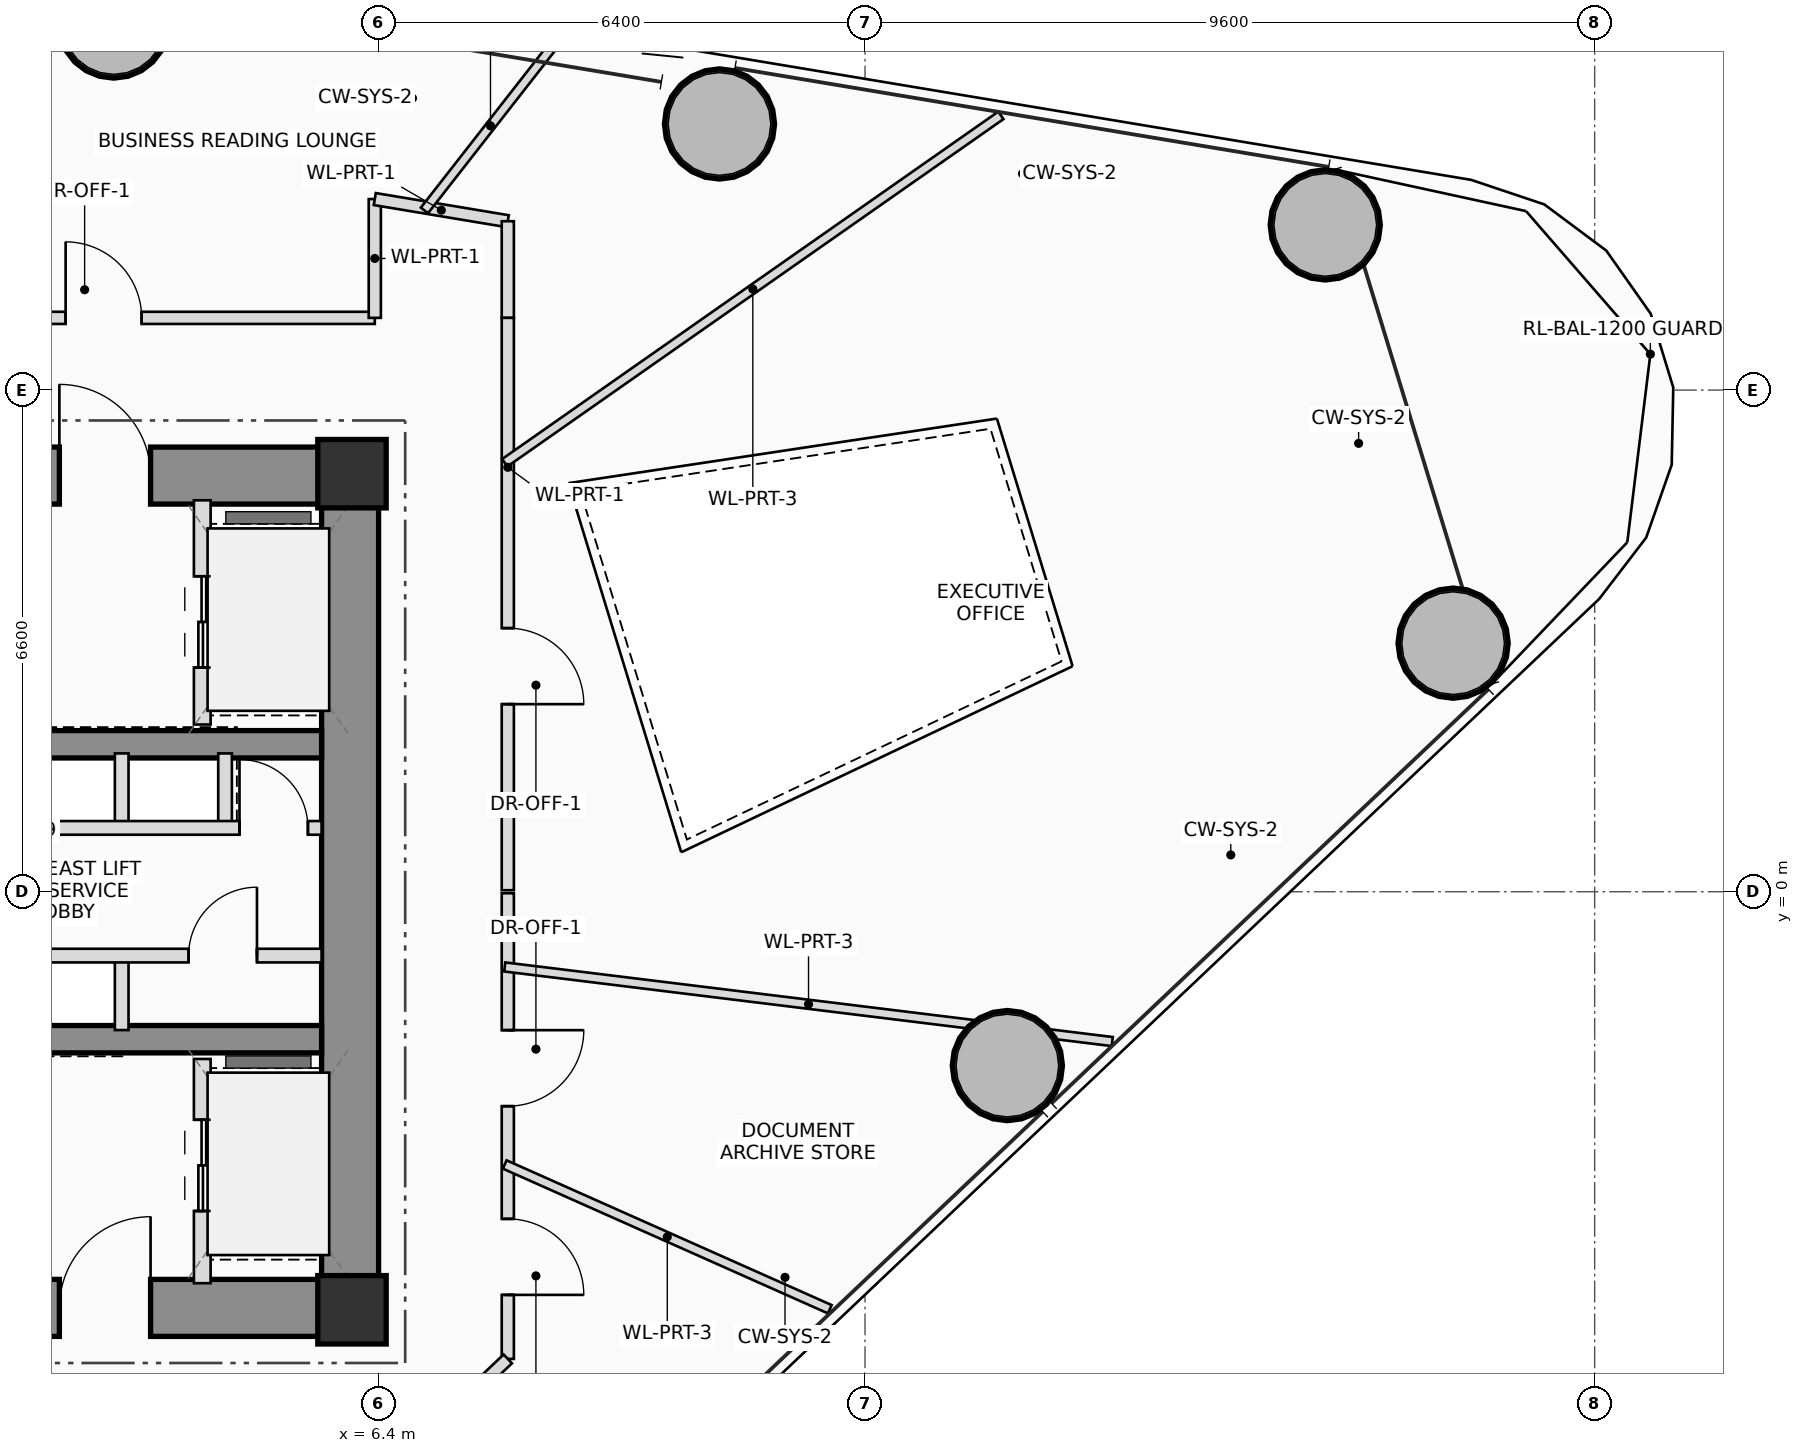
"""IFC4 building model, lengths in metres.
Left out: names, types, materials, properties, quantities, classifications, styles, units other than length and angle.
Written with IfcOpenShell. Run it as: python <this file> out.ifc"""

import sys

from ifc_helpers import new_model, si_unit, direction, frame, frame_2d, origin, origin_2d, place, context, subcontext, project, spatial, rectangle, hollow_circle, extrude, source, transform, mapped, element, fill, save


model = new_model("IFC4")
c1 = context("Model", 3, precision=1e-05, world=origin(), true_north=direction((0.0, 1.0)))
c2 = subcontext(c1, "Body", "Model", "MODEL_VIEW")
j1 = project(units=[si_unit("LENGTHUNIT", "METRE"), si_unit("PLANEANGLEUNIT", "RADIAN")], contexts=[c1])
p1 = place(None, origin())
s1 = spatial("IfcSite", under=j1, at=p1, CompositionType="ELEMENT")
p2 = place(p1, origin())
s2 = spatial("IfcBuilding", under=s1, at=p2, CompositionType="ELEMENT")
p3 = place(p2, frame((0.0, 0.0, 104.9)))
s3 = spatial("IfcBuildingStorey", under=s2, at=p3, CompositionType="ELEMENT", Elevation=104.9)
m1 = source(origin(), c2, "Body", "SweptSolid", [
    extrude(rectangle(XDim=0.9, YDim=0.9, at=origin_2d()), origin(), (0.0, 0.0, 1.0), 3.75),
])
for number, where, z_axis, x_axis in (
    (1, (6.05, -5.5, 0.0), (0.0, 0.0, 1.0), (1.0, 0.0, 0.0)),
    (2, (6.05, 5.5, 0.0), (0.0, 0.0, 1.0), (1.0, 0.0, 0.0)),
):
    element("IfcColumn", number, at=place(p3, frame(where, z_axis=z_axis, x_axis=x_axis)), inside=s3, PredefinedType="COLUMN", context=c2, shape_type="MappedRepresentation", body=[
        mapped(m1, transform((0.0, 0.0, 0.0), scale=1.0)),
    ])
p4 = place(p3, frame((-6.4, 5.475, 0.0), z_axis=(0.0, 0.0, 1.0), x_axis=(1.0, 0.0, 0.0)))
e3 = element("IfcWall", 3, at=p4, inside=s3, PredefinedType="SHEAR", context=c2, shape_type="SweptSolid", body=[
    extrude(rectangle(XDim=12.8, YDim=0.75, at=frame_2d((6.4, 0.0))), origin(), (0.0, 0.0, 1.0), 3.75),
])
p5 = place(p4, frame((8.6, 0.0, 0.0)))
e4 = element("IfcOpeningElement", 4, at=p5, cuts=e3, PredefinedType="OPENING", context=c2, shape_type="SweptSolid", body=[
    extrude(rectangle(XDim=1.2, YDim=2.2, at=frame_2d((0.6, 1.1))), frame((0.0, 0.385, 0.0), z_axis=(0.0, -1.0, 0.0), x_axis=(1.0, 0.0, 0.0)), (0.0, 0.0, 1.0), 0.77),
])
p6 = place(p3, frame((-6.4, -5.475, 0.0), z_axis=(0.0, 0.0, 1.0), x_axis=(1.0, 0.0, 0.0)))
e5 = element("IfcWall", 5, at=p6, inside=s3, PredefinedType="SHEAR", context=c2, shape_type="SweptSolid", body=[
    extrude(rectangle(XDim=12.8, YDim=0.75, at=frame_2d((6.4, 0.0))), origin(), (0.0, 0.0, 1.0), 3.75),
])
p7 = place(p6, frame((8.6, 0.0, 0.0)))
e6 = element("IfcOpeningElement", 6, at=p7, cuts=e5, PredefinedType="OPENING", context=c2, shape_type="SweptSolid", body=[
    extrude(rectangle(XDim=1.2, YDim=2.2, at=frame_2d((0.6, 1.1))), frame((0.0, 0.385, 0.0), z_axis=(0.0, -1.0, 0.0), x_axis=(1.0, 0.0, 0.0)), (0.0, 0.0, 1.0), 0.77),
])
p8 = place(p3, frame((6.025, -5.1, 0.0), z_axis=(0.0, 0.0, 1.0), x_axis=(0.0, 1.0, 0.0)))
e7 = element("IfcWall", 7, at=p8, inside=s3, PredefinedType="SHEAR", context=c2, shape_type="SweptSolid", body=[
    extrude(rectangle(XDim=10.2, YDim=0.75, at=frame_2d((5.1, 0.0))), origin(), (0.0, 0.0, 1.0), 3.75),
])
for number, where, z_axis, x_axis in (
    (8, (-5.65, 1.94, 0.0), (0.0, 0.0, 1.0), (1.0, 0.0, 0.0)),
    (9, (-5.65, -1.94, 0.0), (0.0, 0.0, 1.0), (1.0, 0.0, 0.0)),
):
    element("IfcWall", number, at=place(p3, frame(where, z_axis=z_axis, x_axis=x_axis)), inside=s3, PredefinedType="SHEAR", context=c2, shape_type="SweptSolid", body=[
        extrude(rectangle(XDim=11.3, YDim=0.36, at=frame_2d((5.65, 0.0))), origin(), (0.0, 0.0, 1.0), 3.75),
    ])
m2 = source(origin(), c2, "Body", "SweptSolid", [
    extrude(hollow_circle(Radius=0.725, WallThickness=0.05, at=origin_2d()), origin(), (0.0, 0.0, 1.0), 3.75),
])
for number, where, z_axis, x_axis in (
    (10, (14.673, -2.287, 0.0), (0.0, 0.0, 1.0), (1.0, 0.0, 0.0)),
    (11, (20.538, 3.271, 0.0), (0.0, 0.0, 1.0), (1.0, 0.0, 0.0)),
    (12, (18.855, 8.773, 0.0), (0.0, 0.0, 1.0), (1.0, 0.0, 0.0)),
    (13, (10.885, 10.101, 0.0), (0.0, 0.0, 1.0), (1.0, 0.0, 0.0)),
    (14, (2.915, 11.429, 0.0), (0.0, 0.0, 1.0), (1.0, 0.0, 0.0)),
):
    element("IfcColumn", number, at=place(p3, frame(where, z_axis=z_axis, x_axis=x_axis)), inside=s3, PredefinedType="COLUMN", context=c2, shape_type="MappedRepresentation", body=[
        mapped(m2, transform((0.0, 0.0, 0.0), scale=1.0)),
    ])
p9 = place(p3, frame((4.08, 2.2, 0.0), z_axis=(0.0, 0.0, 1.0), x_axis=(0.0, 1.0, 0.0)))
e15 = element("IfcWall", 15, at=p9, inside=s3, PredefinedType="PLUMBINGWALL", context=c2, shape_type="SweptSolid", body=[
    extrude(rectangle(XDim=2.95, YDim=0.22, at=frame_2d((1.475, 0.0))), origin(), (0.0, 0.0, 1.0), 3.545),
])
p10 = place(p9, frame((0.75, 0.0, 0.0)))
e16 = element("IfcOpeningElement", 16, at=p10, cuts=e15, PredefinedType="OPENING", context=c2, shape_type="SweptSolid", body=[
    extrude(rectangle(XDim=1.2, YDim=2.25, at=frame_2d((0.6, 1.125))), frame((0.0, 0.12, 0.0), z_axis=(0.0, -1.0, 0.0), x_axis=(1.0, 0.0, 0.0)), (0.0, 0.0, 1.0), 0.24),
])
p11 = place(p3, frame((4.08, -5.15, 0.0), z_axis=(0.0, 0.0, 1.0), x_axis=(0.0, 1.0, 0.0)))
e17 = element("IfcWall", 17, at=p11, inside=s3, PredefinedType="PLUMBINGWALL", context=c2, shape_type="SweptSolid", body=[
    extrude(rectangle(XDim=2.95, YDim=0.22, at=frame_2d((1.475, 0.0))), origin(), (0.0, 0.0, 1.0), 3.545),
])
p12 = place(p11, frame((0.95, 0.0, 0.0)))
e18 = element("IfcOpeningElement", 18, at=p12, cuts=e17, PredefinedType="OPENING", context=c2, shape_type="SweptSolid", body=[
    extrude(rectangle(XDim=1.2, YDim=2.25, at=frame_2d((0.6, 1.125))), frame((0.0, 0.12, 0.0), z_axis=(0.0, -1.0, 0.0), x_axis=(1.0, 0.0, 0.0)), (0.0, 0.0, 1.0), 0.24),
])
for number, where, z_axis, x_axis in (
    (19, (3.02, 0.84, 0.0), (0.0, 0.0, 1.0), (0.0, 1.0, 0.0)),
    (20, (4.38, 0.84, 0.0), (0.0, 0.0, 1.0), (0.0, 1.0, 0.0)),
    (21, (3.02, -1.82, 0.0), (0.0, 0.0, 1.0), (0.0, 1.0, 0.0)),
):
    element("IfcWall", number, at=place(p3, frame(where, z_axis=z_axis, x_axis=x_axis)), inside=s3, PredefinedType="PLUMBINGWALL", context=c2, shape_type="SweptSolid", body=[
        extrude(rectangle(XDim=0.98, YDim=0.18, at=frame_2d((0.49, 0.0))), origin(), (0.0, 0.0, 1.0), 3.545),
    ])
p13 = place(p3, frame((-5.68, 0.84, 0.0), z_axis=(0.0, 0.0, 1.0), x_axis=(1.0, 0.0, 0.0)))
e22 = element("IfcWall", 22, at=p13, inside=s3, PredefinedType="PLUMBINGWALL", context=c2, shape_type="SweptSolid", body=[
    extrude(rectangle(XDim=11.33, YDim=0.18, at=frame_2d((5.665, 0.0))), origin(), (0.0, 0.0, 1.0), 3.545),
])
p14 = place(p13, frame((0.43, 0.0, 0.0)))
e23 = element("IfcOpeningElement", 23, at=p14, cuts=e22, PredefinedType="OPENING", context=c2, shape_type="SweptSolid", body=[
    extrude(rectangle(XDim=1.1, YDim=2.2, at=frame_2d((0.55, 1.1))), frame((0.0, 0.1, 0.0), z_axis=(0.0, -1.0, 0.0), x_axis=(1.0, 0.0, 0.0)), (0.0, 0.0, 1.0), 0.2),
])
p15 = place(p13, frame((2.13, 0.0, 0.0)))
e24 = element("IfcOpeningElement", 24, at=p15, cuts=e22, PredefinedType="OPENING", context=c2, shape_type="SweptSolid", body=[
    extrude(rectangle(XDim=1.1, YDim=2.2, at=frame_2d((0.55, 1.1))), frame((0.0, 0.1, 0.0), z_axis=(0.0, -1.0, 0.0), x_axis=(1.0, 0.0, 0.0)), (0.0, 0.0, 1.0), 0.2),
])
p16 = place(p13, frame((10.25, 0.0, 0.0)))
e25 = element("IfcOpeningElement", 25, at=p16, cuts=e22, PredefinedType="OPENING", context=c2, shape_type="SweptSolid", body=[
    extrude(rectangle(XDim=0.9, YDim=2.05, at=frame_2d((0.45, 1.025))), frame((0.0, 0.1, 0.0), z_axis=(0.0, -1.0, 0.0), x_axis=(1.0, 0.0, 0.0)), (0.0, 0.0, 1.0), 0.2),
])
p17 = place(p3, frame((-5.68, -0.84, 0.0), z_axis=(0.0, 0.0, 1.0), x_axis=(1.0, 0.0, 0.0)))
e26 = element("IfcWall", 26, at=p17, inside=s3, PredefinedType="PLUMBINGWALL", context=c2, shape_type="SweptSolid", body=[
    extrude(rectangle(XDim=11.33, YDim=0.18, at=frame_2d((5.665, 0.0))), origin(), (0.0, 0.0, 1.0), 3.545),
])
p18 = place(p17, frame((0.43, 0.0, 0.0)))
e27 = element("IfcOpeningElement", 27, at=p18, cuts=e26, PredefinedType="OPENING", context=c2, shape_type="SweptSolid", body=[
    extrude(rectangle(XDim=1.1, YDim=2.2, at=frame_2d((0.55, 1.1))), frame((0.0, 0.1, 0.0), z_axis=(0.0, -1.0, 0.0), x_axis=(1.0, 0.0, 0.0)), (0.0, 0.0, 1.0), 0.2),
])
p19 = place(p17, frame((2.13, 0.0, 0.0)))
e28 = element("IfcOpeningElement", 28, at=p19, cuts=e26, PredefinedType="OPENING", context=c2, shape_type="SweptSolid", body=[
    extrude(rectangle(XDim=1.1, YDim=2.2, at=frame_2d((0.55, 1.1))), frame((0.0, 0.1, 0.0), z_axis=(0.0, -1.0, 0.0), x_axis=(1.0, 0.0, 0.0)), (0.0, 0.0, 1.0), 0.2),
])
p20 = place(p17, frame((9.58, 0.0, 0.0)))
e29 = element("IfcOpeningElement", 29, at=p20, cuts=e26, PredefinedType="OPENING", context=c2, shape_type="SweptSolid", body=[
    extrude(rectangle(XDim=0.9, YDim=2.05, at=frame_2d((0.45, 1.025))), frame((0.0, 0.1, 0.0), z_axis=(0.0, -1.0, 0.0), x_axis=(1.0, 0.0, 0.0)), (0.0, 0.0, 1.0), 0.2),
])
p21 = place(p3, frame((-6.35, 7.55, 0.0), z_axis=(0.0, 0.0, 1.0), x_axis=(1.0, 0.0, 0.0)))
e30 = element("IfcWall", 30, at=p21, inside=s3, PredefinedType="PARTITIONING", context=c2, shape_type="SweptSolid", body=[
    extrude(rectangle(XDim=12.7, YDim=0.16, at=frame_2d((6.35, 0.0))), origin(), (0.0, 0.0, 1.0), 2.85),
])
p22 = place(p21, frame((4.111, 0.0, 0.0)))
e31 = element("IfcOpeningElement", 31, at=p22, cuts=e30, PredefinedType="OPENING", context=c2, shape_type="SweptSolid", body=[
    extrude(rectangle(XDim=1.0, YDim=2.25, at=frame_2d((0.5, 1.125))), frame((0.0, 0.09, 0.0), z_axis=(0.0, -1.0, 0.0), x_axis=(1.0, 0.0, 0.0)), (0.0, 0.0, 1.0), 0.18),
])
p23 = place(p21, frame((8.632, 0.0, 0.0)))
e32 = element("IfcOpeningElement", 32, at=p23, cuts=e30, PredefinedType="OPENING", context=c2, shape_type="SweptSolid", body=[
    extrude(rectangle(XDim=1.0, YDim=2.25, at=frame_2d((0.5, 1.125))), frame((0.0, 0.09, 0.0), z_axis=(0.0, -1.0, 0.0), x_axis=(1.0, 0.0, 0.0)), (0.0, 0.0, 1.0), 0.18),
])
p24 = place(p3, frame((6.35, 7.55, 0.0), z_axis=(0.0, 0.0, 1.0), x_axis=(0.0, 1.0, 0.0)))
e33 = element("IfcWall", 33, at=p24, inside=s3, PredefinedType="PARTITIONING", context=c2, shape_type="SweptSolid", body=[
    extrude(rectangle(XDim=1.563, YDim=0.16, at=frame_2d((0.781, 0.0))), origin(), (0.0, 0.0, 1.0), 3.05),
])
p25 = place(p3, frame((6.35, 9.113, 0.0), z_axis=(0.0, 0.0, 1.0), x_axis=(0.986386484459, -0.164443617317, 0.0)))
e34 = element("IfcWall", 34, at=p25, inside=s3, PredefinedType="PARTITIONING", context=c2, shape_type="SweptSolid", body=[
    extrude(rectangle(XDim=1.774, YDim=0.16, at=frame_2d((0.887, 0.0))), origin(), (0.0, 0.0, 1.0), 3.2),
])
p26 = place(p3, frame((8.1, 8.821, 0.0), z_axis=(0.0, 0.0, 1.0), x_axis=(0.0, -1.0, 0.0)))
e35 = element("IfcWall", 35, at=p26, inside=s3, PredefinedType="PARTITIONING", context=c2, shape_type="SweptSolid", body=[
    extrude(rectangle(XDim=1.271, YDim=0.16, at=frame_2d((0.636, 0.0))), origin(), (0.0, 0.0, 1.0), 2.85),
])
p27 = place(p3, frame((8.1, 7.55, 0.0), z_axis=(0.0, 0.0, 1.0), x_axis=(0.0, -1.0, 0.0)))
e36 = element("IfcWall", 36, at=p27, inside=s3, PredefinedType="PARTITIONING", context=c2, shape_type="SweptSolid", body=[
    extrude(rectangle(XDim=7.53, YDim=0.16, at=frame_2d((3.765, 0.0))), origin(), (0.0, 0.0, 1.0), 2.85),
])
p28 = place(p27, frame((4.082, 0.0, 0.0)))
e37 = element("IfcOpeningElement", 37, at=p28, cuts=e36, PredefinedType="OPENING", context=c2, shape_type="SweptSolid", body=[
    extrude(rectangle(XDim=1.0, YDim=2.25, at=frame_2d((0.5, 1.125))), frame((0.0, 0.09, 0.0), z_axis=(0.0, -1.0, 0.0), x_axis=(1.0, 0.0, 0.0)), (0.0, 0.0, 1.0), 0.18),
])
p29 = place(p3, frame((8.1, -0.02, 0.0), z_axis=(0.0, 0.0, 1.0), x_axis=(0.0, -1.0, 0.0)))
e38 = element("IfcWall", 38, at=p29, inside=s3, PredefinedType="PARTITIONING", context=c2, shape_type="SweptSolid", body=[
    extrude(rectangle(XDim=6.126, YDim=0.16, at=frame_2d((3.063, 0.0))), origin(), (0.0, 0.0, 1.0), 2.85),
])
p30 = place(p29, frame((1.801, 0.0, 0.0)))
e39 = element("IfcOpeningElement", 39, at=p30, cuts=e38, PredefinedType="OPENING", context=c2, shape_type="SweptSolid", body=[
    extrude(rectangle(XDim=1.0, YDim=2.25, at=frame_2d((0.5, 1.125))), frame((0.0, 0.09, 0.0), z_axis=(0.0, -1.0, 0.0), x_axis=(1.0, 0.0, 0.0)), (0.0, 0.0, 1.0), 0.18),
])
p31 = place(p29, frame((4.284, 0.0, 0.0)))
e40 = element("IfcOpeningElement", 40, at=p31, cuts=e38, PredefinedType="OPENING", context=c2, shape_type="SweptSolid", body=[
    extrude(rectangle(XDim=1.0, YDim=2.25, at=frame_2d((0.5, 1.125))), frame((0.0, 0.09, 0.0), z_axis=(0.0, -1.0, 0.0), x_axis=(1.0, 0.0, 0.0)), (0.0, 0.0, 1.0), 0.18),
])
p32 = place(p3, frame((8.1, -6.146, 0.0), z_axis=(0.0, 0.0, 1.0), x_axis=(-0.725888815428, -0.687812058368, 0.0)))
e41 = element("IfcWall", 41, at=p32, inside=s3, PredefinedType="PARTITIONING", context=c2, shape_type="SweptSolid", body=[
    extrude(rectangle(XDim=2.411, YDim=0.16, at=frame_2d((1.206, 0.0))), origin(), (0.0, 0.0, 1.0), 2.85),
])
p33 = place(p3, frame((8.06, -3.588, 0.0), z_axis=(0.0, 0.0, 1.0), x_axis=(0.913536081089, -0.406757702506, 0.0)))
e42 = element("IfcWall", 42, at=p33, inside=s3, PredefinedType="PARTITIONING", context=c2, shape_type="SweptSolid", body=[
    extrude(rectangle(XDim=4.682, YDim=0.12, at=frame_2d((2.341, 0.0))), origin(), (0.0, 0.0, 1.0), 2.85),
])
p34 = place(p3, frame((8.06, -0.99, 0.0), z_axis=(0.0, 0.0, 1.0), x_axis=(0.99254191086, -0.121903876831, 0.0)))
e43 = element("IfcWall", 43, at=p34, inside=s3, PredefinedType="PARTITIONING", context=c2, shape_type="SweptSolid", body=[
    extrude(rectangle(XDim=8.053, YDim=0.12, at=frame_2d((4.026, 0.0))), origin(), (0.0, 0.0, 1.0), 2.85),
])
p35 = place(p3, frame((8.06, 5.644, 0.0), z_axis=(0.0, 0.0, 1.0), x_axis=(0.819162822725, 0.573561042841, 0.0)))
e44 = element("IfcWall", 44, at=p35, inside=s3, PredefinedType="PARTITIONING", context=c2, shape_type="SweptSolid", body=[
    extrude(rectangle(XDim=7.968, YDim=0.12, at=frame_2d((3.984, 0.0))), origin(), (0.0, 0.0, 1.0), 2.85),
])
p36 = place(p3, frame((7.003, 8.964, 0.0), z_axis=(0.0, 0.0, 1.0), x_axis=(0.615657467661, 0.788013884721, 0.0)))
e45 = element("IfcWall", 45, at=p36, inside=s3, PredefinedType="PARTITIONING", context=c2, shape_type="SweptSolid", body=[
    extrude(rectangle(XDim=2.823, YDim=0.12, at=frame_2d((1.412, 0.0))), origin(), (0.0, 0.0, 1.0), 3.01),
])
p37 = place(p5, origin())
e46 = element("IfcDoor", 46, at=p37, inside=s3, OperationType="SINGLE_SWING_LEFT", PredefinedType="DOOR", context=c2, shape_type="SweptSolid", body=[
    extrude(rectangle(XDim=1.2, YDim=2.2, at=frame_2d((0.6, 1.1))), frame((0.0, 0.025, 0.0), z_axis=(0.0, -1.0, 0.0), x_axis=(1.0, 0.0, 0.0)), (0.0, 0.0, 1.0), 0.05),
])
fill(e4, e46)
p38 = place(p7, origin())
e47 = element("IfcDoor", 47, at=p38, inside=s3, OperationType="SINGLE_SWING_RIGHT", PredefinedType="DOOR", context=c2, shape_type="SweptSolid", body=[
    extrude(rectangle(XDim=1.2, YDim=2.2, at=frame_2d((0.6, 1.1))), frame((0.0, 0.025, 0.0), z_axis=(0.0, -1.0, 0.0), x_axis=(1.0, 0.0, 0.0)), (0.0, 0.0, 1.0), 0.05),
])
fill(e6, e47)
p39 = place(p10, origin())
e48 = element("IfcDoor", 48, at=p39, inside=s3, OperationType="DOUBLE_DOOR_SLIDING", PredefinedType="DOOR", context=c2, shape_type="SweptSolid", body=[
    extrude(rectangle(XDim=1.2, YDim=2.25, at=frame_2d((0.6, 1.125))), frame((0.0, 0.025, 0.0), z_axis=(0.0, -1.0, 0.0), x_axis=(1.0, 0.0, 0.0)), (0.0, 0.0, 1.0), 0.05),
])
fill(e16, e48)
p40 = place(p12, origin())
e49 = element("IfcDoor", 49, at=p40, inside=s3, OperationType="DOUBLE_DOOR_SLIDING", PredefinedType="DOOR", context=c2, shape_type="SweptSolid", body=[
    extrude(rectangle(XDim=1.2, YDim=2.25, at=frame_2d((0.6, 1.125))), frame((0.0, 0.025, 0.0), z_axis=(0.0, -1.0, 0.0), x_axis=(1.0, 0.0, 0.0)), (0.0, 0.0, 1.0), 0.05),
])
fill(e18, e49)
p41 = place(p16, origin())
e50 = element("IfcDoor", 50, at=p41, inside=s3, OperationType="SINGLE_SWING_LEFT", PredefinedType="DOOR", context=c2, shape_type="SweptSolid", body=[
    extrude(rectangle(XDim=0.9, YDim=2.05, at=frame_2d((0.45, 1.025))), frame((0.0, 0.025, 0.0), z_axis=(0.0, -1.0, 0.0), x_axis=(1.0, 0.0, 0.0)), (0.0, 0.0, 1.0), 0.05),
])
fill(e25, e50)
p42 = place(p20, origin())
e51 = element("IfcDoor", 51, at=p42, inside=s3, OperationType="SINGLE_SWING_RIGHT", PredefinedType="DOOR", context=c2, shape_type="SweptSolid", body=[
    extrude(rectangle(XDim=0.9, YDim=2.05, at=frame_2d((0.45, 1.025))), frame((0.0, 0.025, 0.0), z_axis=(0.0, -1.0, 0.0), x_axis=(1.0, 0.0, 0.0)), (0.0, 0.0, 1.0), 0.05),
])
fill(e29, e51)
p43 = place(p23, origin())
e52 = element("IfcDoor", 52, at=p43, inside=s3, OperationType="SINGLE_SWING_LEFT", PredefinedType="DOOR", context=c2, shape_type="SweptSolid", body=[
    extrude(rectangle(XDim=1.0, YDim=2.25, at=frame_2d((0.5, 1.125))), frame((0.0, 0.025, 0.0), z_axis=(0.0, -1.0, 0.0), x_axis=(1.0, 0.0, 0.0)), (0.0, 0.0, 1.0), 0.05),
])
fill(e32, e52)
p44 = place(p28, origin())
e53 = element("IfcDoor", 53, at=p44, inside=s3, OperationType="SINGLE_SWING_RIGHT", PredefinedType="DOOR", context=c2, shape_type="SweptSolid", body=[
    extrude(rectangle(XDim=1.0, YDim=2.25, at=frame_2d((0.5, 1.125))), frame((0.0, 0.025, 0.0), z_axis=(0.0, -1.0, 0.0), x_axis=(1.0, 0.0, 0.0)), (0.0, 0.0, 1.0), 0.05),
])
fill(e37, e53)
p45 = place(p30, origin())
e54 = element("IfcDoor", 54, at=p45, inside=s3, OperationType="SINGLE_SWING_LEFT", PredefinedType="DOOR", context=c2, shape_type="SweptSolid", body=[
    extrude(rectangle(XDim=1.0, YDim=2.25, at=frame_2d((0.5, 1.125))), frame((0.0, 0.025, 0.0), z_axis=(0.0, -1.0, 0.0), x_axis=(1.0, 0.0, 0.0)), (0.0, 0.0, 1.0), 0.05),
])
fill(e39, e54)
p46 = place(p31, origin())
e55 = element("IfcDoor", 55, at=p46, inside=s3, OperationType="SINGLE_SWING_RIGHT", PredefinedType="DOOR", context=c2, shape_type="SweptSolid", body=[
    extrude(rectangle(XDim=1.0, YDim=2.25, at=frame_2d((0.5, 1.125))), frame((0.0, 0.025, 0.0), z_axis=(0.0, -1.0, 0.0), x_axis=(1.0, 0.0, 0.0)), (0.0, 0.0, 1.0), 0.05),
])
fill(e40, e55)
save(model, sys.argv[1])
